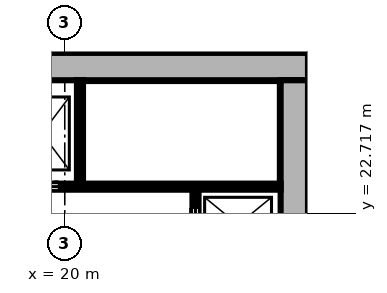
"""IFC4 building model, lengths in metres.
Left out: names, types, materials, properties, quantities, classifications, styles, units other than length and angle.
Written with IfcOpenShell. Run it as: python <this file> out.ifc"""

import sys

from ifc_helpers import new_model, si_unit, direction, frame, frame_2d, origin, place, context, subcontext, project, spatial, rectangle, extrude, element, fill, save


model = new_model("IFC4")
c1 = context("Model", 3, precision=1e-05, world=origin(), true_north=direction((0.0, 1.0)))
c2 = subcontext(c1, "Body", "Model", "MODEL_VIEW")
j1 = project(units=[si_unit("LENGTHUNIT", "METRE"), si_unit("PLANEANGLEUNIT", "RADIAN")], contexts=[c1])
p1 = place(None, origin())
s1 = spatial("IfcSite", under=j1, at=p1, CompositionType="ELEMENT")
p2 = place(p1, origin())
s2 = spatial("IfcBuilding", under=s1, at=p2, CompositionType="ELEMENT")
p3 = place(p2, origin())
s3 = spatial("IfcBuildingStorey", under=s2, at=p3, CompositionType="ELEMENT", Elevation=0.0)
p4 = place(p3, frame((27.55, 8.9, 0.0), z_axis=(0.0, 0.0, 1.0), x_axis=(0.0, 1.0, 0.0)))
e1 = element("IfcWall", 1, at=p4, inside=s3, PredefinedType="SHEAR", context=c2, shape_type="SweptSolid", body=[
    extrude(rectangle(XDim=18.2, YDim=0.9, at=frame_2d((9.1, 0.0))), origin(), (0.0, 0.0, 1.0), 6.0),
])
p5 = place(p4, frame((4.55, 0.0, 0.0)))
e2 = element("IfcOpeningElement", 2, at=p5, cuts=e1, PredefinedType="OPENING", context=c2, shape_type="SweptSolid", body=[
    extrude(rectangle(XDim=1.6, YDim=2.1, at=frame_2d((0.8, 1.05))), frame((0.0, 0.46, 0.0), z_axis=(0.0, -1.0, 0.0), x_axis=(1.0, 0.0, 0.0)), (0.0, 0.0, 1.0), 0.92),
])
p6 = place(p3, frame((28.0, 27.55, 0.0), z_axis=(0.0, 0.0, 1.0), x_axis=(-1.0, 0.0, 0.0)))
e3 = element("IfcWall", 3, at=p6, inside=s3, PredefinedType="SHEAR", context=c2, shape_type="SweptSolid", body=[
    extrude(rectangle(XDim=20.0, YDim=0.9, at=frame_2d((10.0, 0.0))), origin(), (0.0, 0.0, 1.0), 6.0),
])
p7 = place(p3, frame((13.8, 23.6, 0.0), z_axis=(0.0, 0.0, 1.0), x_axis=(1.0, 0.0, 0.0)))
e4 = element("IfcWall", 4, at=p7, inside=s3, PredefinedType="SHEAR", context=c2, shape_type="SweptSolid", body=[
    extrude(rectangle(XDim=13.3, YDim=0.2, at=frame_2d((6.65, 0.0))), origin(), (0.0, 0.0, 1.0), 5.55),
])
p8 = place(p7, frame((2.4, 0.0, 0.0)))
e5 = element("IfcOpeningElement", 5, at=p8, cuts=e4, PredefinedType="OPENING", context=c2, shape_type="SweptSolid", body=[
    extrude(rectangle(XDim=1.1, YDim=2.1, at=frame_2d((0.55, 1.05))), frame((0.0, 0.11, 0.0), z_axis=(0.0, -1.0, 0.0), x_axis=(1.0, 0.0, 0.0)), (0.0, 0.0, 1.0), 0.22),
])
p9 = place(p7, frame((4.9, 0.0, 0.0)))
e6 = element("IfcOpeningElement", 6, at=p9, cuts=e4, PredefinedType="OPENING", context=c2, shape_type="SweptSolid", body=[
    extrude(rectangle(XDim=1.1, YDim=2.1, at=frame_2d((0.55, 1.05))), frame((0.0, 0.11, 0.0), z_axis=(0.0, -1.0, 0.0), x_axis=(1.0, 0.0, 0.0)), (0.0, 0.0, 1.0), 0.22),
])
p10 = place(p7, frame((0.25, 0.0, 0.0)))
e7 = element("IfcOpeningElement", 7, at=p10, cuts=e4, PredefinedType="OPENING", context=c2, shape_type="SweptSolid", body=[
    extrude(rectangle(XDim=1.0, YDim=2.1, at=frame_2d((0.5, 1.05))), frame((0.0, 0.11, 0.0), z_axis=(0.0, -1.0, 0.0), x_axis=(1.0, 0.0, 0.0)), (0.0, 0.0, 1.0), 0.22),
])
p11 = place(p3, frame((20.5, 23.6, 0.0), z_axis=(0.0, 0.0, 1.0), x_axis=(0.0, 1.0, 0.0)))
e8 = element("IfcWall", 8, at=p11, inside=s3, PredefinedType="SHEAR", context=c2, shape_type="SweptSolid", body=[
    extrude(rectangle(XDim=3.5, YDim=0.2, at=frame_2d((1.75, 0.0))), origin(), (0.0, 0.0, 1.0), 5.55),
])
p12 = place(p3, frame((24.3, 16.1, 0.0), z_axis=(0.0, 0.0, 1.0), x_axis=(0.0, 1.0, 0.0)))
e9 = element("IfcWall", 9, at=p12, inside=s3, PredefinedType="SHEAR", context=c2, shape_type="SweptSolid", body=[
    extrude(rectangle(XDim=7.5, YDim=0.2, at=frame_2d((3.75, 0.0))), origin(), (0.0, 0.0, 1.0), 5.55),
])
p13 = place(p12, frame((0.7, 0.0, 0.0)))
e10 = element("IfcOpeningElement", 10, at=p13, cuts=e9, PredefinedType="OPENING", context=c2, shape_type="SweptSolid", body=[
    extrude(rectangle(XDim=1.1, YDim=2.1, at=frame_2d((0.55, 1.05))), frame((0.0, 0.11, 0.0), z_axis=(0.0, -1.0, 0.0), x_axis=(1.0, 0.0, 0.0)), (0.0, 0.0, 1.0), 0.22),
])
p14 = place(p12, frame((3.2, 0.0, 0.0)))
e11 = element("IfcOpeningElement", 11, at=p14, cuts=e9, PredefinedType="OPENING", context=c2, shape_type="SweptSolid", body=[
    extrude(rectangle(XDim=1.1, YDim=2.1, at=frame_2d((0.55, 1.05))), frame((0.0, 0.11, 0.0), z_axis=(0.0, -1.0, 0.0), x_axis=(1.0, 0.0, 0.0)), (0.0, 0.0, 1.0), 0.22),
])
p15 = place(p12, frame((5.7, 0.0, 0.0)))
e12 = element("IfcOpeningElement", 12, at=p15, cuts=e9, PredefinedType="OPENING", context=c2, shape_type="SweptSolid", body=[
    extrude(rectangle(XDim=1.1, YDim=2.1, at=frame_2d((0.55, 1.05))), frame((0.0, 0.11, 0.0), z_axis=(0.0, -1.0, 0.0), x_axis=(1.0, 0.0, 0.0)), (0.0, 0.0, 1.0), 0.22),
])
p16 = place(p15, origin())
e13 = element("IfcDoor", 13, at=p16, inside=s3, OperationType="DOUBLE_DOOR_SLIDING", PredefinedType="DOOR", context=c2, shape_type="SweptSolid", body=[
    extrude(rectangle(XDim=1.1, YDim=2.1, at=frame_2d((0.55, 1.05))), frame((0.0, 0.025, 0.0), z_axis=(0.0, -1.0, 0.0), x_axis=(1.0, 0.0, 0.0)), (0.0, 0.0, 1.0), 0.05),
])
fill(e12, e13)
p17 = place(p9, origin())
e14 = element("IfcDoor", 14, at=p17, inside=s3, OperationType="DOUBLE_DOOR_SLIDING", PredefinedType="DOOR", context=c2, shape_type="SweptSolid", body=[
    extrude(rectangle(XDim=1.1, YDim=2.1, at=frame_2d((0.55, 1.05))), frame((0.0, 0.025, 0.0), z_axis=(0.0, -1.0, 0.0), x_axis=(1.0, 0.0, 0.0)), (0.0, 0.0, 1.0), 0.05),
])
fill(e6, e14)
save(model, sys.argv[1])
